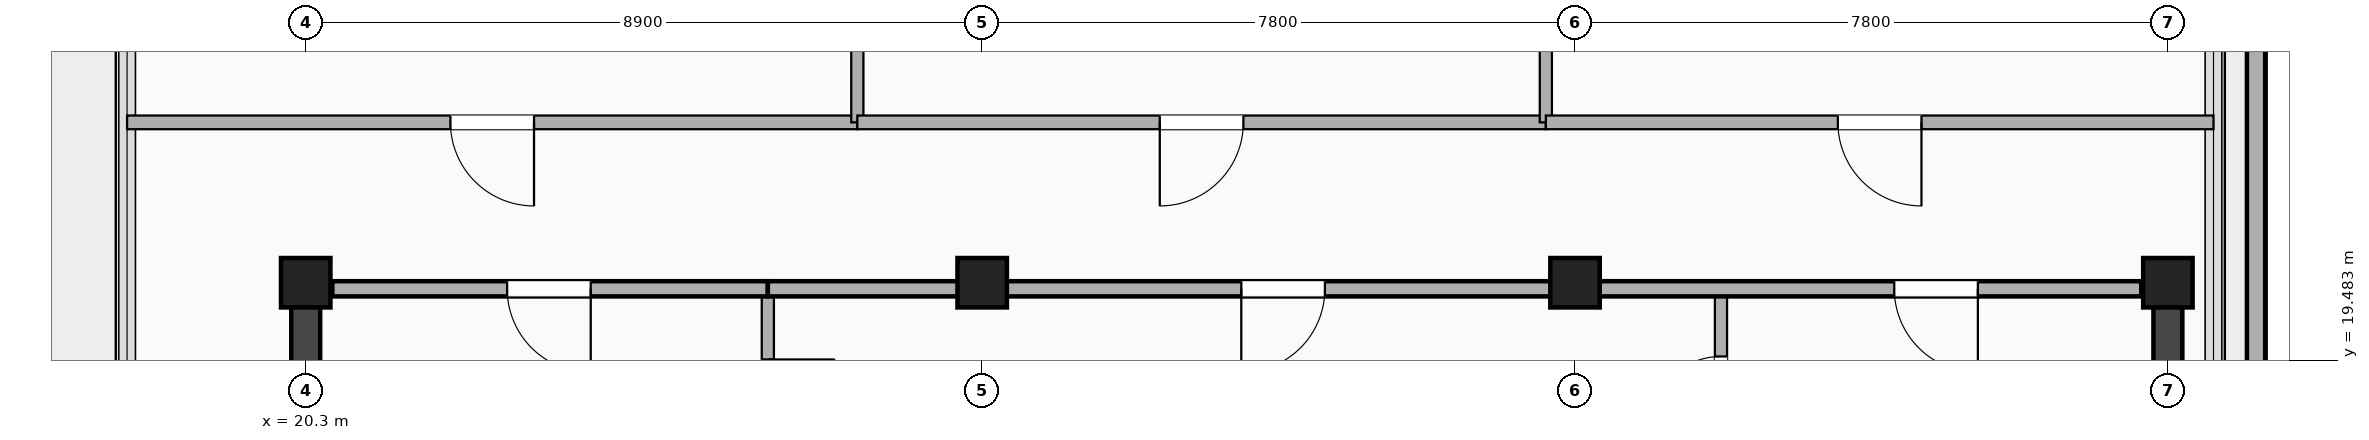
"""IFC4 building model, lengths in metres.
Left out: names, types, materials, properties, quantities, classifications, styles, units other than length and angle.
Written with IfcOpenShell. Run it as: python <this file> out.ifc"""

import sys

from ifc_helpers import new_model, si_unit, direction, frame, frame_2d, origin, origin_2d, place, context, subcontext, project, spatial, rectangle, extrude, element, fill, save


model = new_model("IFC4")
c1 = context("Model", 3, precision=1e-05, world=origin(), true_north=direction((0.0, 1.0)))
c2 = subcontext(c1, "Body", "Model", "MODEL_VIEW")
j1 = project(units=[si_unit("LENGTHUNIT", "METRE"), si_unit("PLANEANGLEUNIT", "RADIAN")], contexts=[c1])
p1 = place(None, origin())
s1 = spatial("IfcSite", under=j1, at=p1, CompositionType="ELEMENT")
p2 = place(p1, origin())
s2 = spatial("IfcBuilding", under=s1, at=p2, CompositionType="ELEMENT")
p3 = place(p2, frame((0.0, 0.0, 303.3)))
s3 = spatial("IfcBuildingStorey", under=s2, at=p3, CompositionType="ELEMENT", Elevation=303.3)
for number, where, z_axis, x_axis in (
    (1, (20.3, 3.5, 0.0), (0.0, 0.0, 1.0), (0.0, 1.0, 0.0)),
    (2, (44.8, 3.5, 0.0), (0.0, 0.0, 1.0), (0.0, 1.0, 0.0)),
):
    element("IfcWall", number, at=place(p3, frame(where, z_axis=z_axis, x_axis=x_axis)), inside=s3, PredefinedType="SHEAR", context=c2, shape_type="SweptSolid", body=[
        extrude(rectangle(XDim=16.9, YDim=0.38, at=frame_2d((8.45, 0.0))), origin(), (0.0, 0.0, 1.0), 4.3),
    ])
for number, where, z_axis, x_axis in (
    (3, (20.3, 20.5, -0.3), (0.0, 0.0, 1.0), (1.0, 0.0, 0.0)),
    (4, (29.2, 20.5, -0.3), (0.0, 0.0, 1.0), (1.0, 0.0, 0.0)),
    (5, (37.0, 20.5, -0.3), (0.0, 0.0, 1.0), (1.0, 0.0, 0.0)),
    (6, (44.8, 20.5, -0.3), (0.0, 0.0, 1.0), (1.0, 0.0, 0.0)),
):
    element("IfcColumn", number, at=place(p3, frame(where, z_axis=z_axis, x_axis=x_axis)), inside=s3, PredefinedType="COLUMN", context=c2, shape_type="SweptSolid", body=[
        extrude(rectangle(XDim=0.65, YDim=0.65, at=origin_2d()), origin(), (0.0, 0.0, 1.0), 4.6),
    ])
p4 = place(p3, frame((45.96, 3.5, 0.0), z_axis=(0.0, 0.0, 1.0), x_axis=(0.0, 1.0, 0.0)))
e7 = element("IfcWall", 7, at=p4, inside=s3, PredefinedType="PARAPET", context=c2, shape_type="SweptSolid", body=[
    extrude(rectangle(XDim=24.7, YDim=0.24, at=frame_2d((12.35, 0.0))), origin(), (0.0, 0.0, 1.0), 1.25),
])
p5 = place(p3, frame((26.38, 17.76, 0.0), z_axis=(0.0, 0.0, 1.0), x_axis=(0.0, 1.0, 0.0)))
e8 = element("IfcWall", 8, at=p5, inside=s3, PredefinedType="PARTITIONING", context=c2, shape_type="SweptSolid", body=[
    extrude(rectangle(XDim=2.66, YDim=0.16, at=frame_2d((1.33, 0.0))), origin(), (0.0, 0.0, 1.0), 3.512),
])
p6 = place(p5, frame((0.85, 0.0, 0.0)))
e9 = element("IfcOpeningElement", 9, at=p6, cuts=e8, PredefinedType="OPENING", context=c2, shape_type="SweptSolid", body=[
    extrude(rectangle(XDim=0.88, YDim=2.08, at=frame_2d((0.44, 1.04))), frame((0.0, 0.09, 0.0), z_axis=(0.0, -1.0, 0.0), x_axis=(1.0, 0.0, 0.0)), (0.0, 0.0, 1.0), 0.18),
])
p7 = place(p3, frame((38.92, 17.76, 0.0), z_axis=(0.0, 0.0, 1.0), x_axis=(0.0, 1.0, 0.0)))
e10 = element("IfcWall", 10, at=p7, inside=s3, PredefinedType="PARTITIONING", context=c2, shape_type="SweptSolid", body=[
    extrude(rectangle(XDim=2.66, YDim=0.16, at=frame_2d((1.33, 0.0))), origin(), (0.0, 0.0, 1.0), 3.885),
])
p8 = place(p7, frame((1.77, 0.0, 0.0), z_axis=(0.0, 0.0, 1.0), x_axis=(-1.0, 0.0, 0.0)))
e11 = element("IfcOpeningElement", 11, at=p8, cuts=e10, PredefinedType="OPENING", context=c2, shape_type="SweptSolid", body=[
    extrude(rectangle(XDim=0.92, YDim=2.08, at=frame_2d((0.46, 1.04))), frame((0.0, 0.09, 0.0), z_axis=(0.0, -1.0, 0.0), x_axis=(1.0, 0.0, 0.0)), (0.0, 0.0, 1.0), 0.18),
])
p9 = place(p3, frame((20.65, 20.42, 0.0), z_axis=(0.0, 0.0, 1.0), x_axis=(1.0, 0.0, 0.0)))
e12 = element("IfcWall", 12, at=p9, inside=s3, PredefinedType="PARTITIONING", context=c2, shape_type="SweptSolid", body=[
    extrude(rectangle(XDim=5.73, YDim=0.2, at=frame_2d((2.865, 0.0))), origin(), (0.0, 0.0, 1.0), 2.605),
])
p10 = place(p9, frame((2.3, 0.0, 0.0)))
e13 = element("IfcOpeningElement", 13, at=p10, cuts=e12, PredefinedType="OPENING", context=c2, shape_type="SweptSolid", body=[
    extrude(rectangle(XDim=1.1, YDim=2.15, at=frame_2d((0.55, 1.075))), frame((0.0, 0.11, 0.0), z_axis=(0.0, -1.0, 0.0), x_axis=(1.0, 0.0, 0.0)), (0.0, 0.0, 1.0), 0.22),
])
p11 = place(p3, frame((26.38, 20.42, 0.0), z_axis=(0.0, 0.0, 1.0), x_axis=(1.0, 0.0, 0.0)))
e14 = element("IfcWall", 14, at=p11, inside=s3, PredefinedType="PARTITIONING", context=c2, shape_type="SweptSolid", body=[
    extrude(rectangle(XDim=2.82, YDim=0.2, at=frame_2d((1.41, 0.0))), origin(), (0.0, 0.0, 1.0), 2.605),
])
p12 = place(p3, frame((29.2, 20.42, 0.0), z_axis=(0.0, 0.0, 1.0), x_axis=(1.0, 0.0, 0.0)))
e15 = element("IfcWall", 15, at=p12, inside=s3, PredefinedType="PARTITIONING", context=c2, shape_type="SweptSolid", body=[
    extrude(rectangle(XDim=7.8, YDim=0.2, at=frame_2d((3.9, 0.0))), origin(), (0.0, 0.0, 1.0), 2.605),
])
p13 = place(p12, frame((3.409, 0.0, 0.0)))
e16 = element("IfcOpeningElement", 16, at=p13, cuts=e15, PredefinedType="OPENING", context=c2, shape_type="SweptSolid", body=[
    extrude(rectangle(XDim=1.1, YDim=2.15, at=frame_2d((0.55, 1.075))), frame((0.0, 0.11, 0.0), z_axis=(0.0, -1.0, 0.0), x_axis=(1.0, 0.0, 0.0)), (0.0, 0.0, 1.0), 0.22),
])
p14 = place(p3, frame((37.0, 20.42, 0.0), z_axis=(0.0, 0.0, 1.0), x_axis=(1.0, 0.0, 0.0)))
e17 = element("IfcWall", 17, at=p14, inside=s3, PredefinedType="PARTITIONING", context=c2, shape_type="SweptSolid", body=[
    extrude(rectangle(XDim=7.45, YDim=0.2, at=frame_2d((3.725, 0.0))), origin(), (0.0, 0.0, 1.0), 2.605),
])
p15 = place(p14, frame((4.2, 0.0, 0.0)))
e18 = element("IfcOpeningElement", 18, at=p15, cuts=e17, PredefinedType="OPENING", context=c2, shape_type="SweptSolid", body=[
    extrude(rectangle(XDim=1.1, YDim=2.15, at=frame_2d((0.55, 1.075))), frame((0.0, 0.11, 0.0), z_axis=(0.0, -1.0, 0.0), x_axis=(1.0, 0.0, 0.0)), (0.0, 0.0, 1.0), 0.22),
])
p16 = place(p3, frame((17.95, 22.61, 0.0), z_axis=(0.0, 0.0, 1.0), x_axis=(1.0, 0.0, 0.0)))
e19 = element("IfcWall", 19, at=p16, inside=s3, PredefinedType="PARTITIONING", context=c2, shape_type="SweptSolid", body=[
    extrude(rectangle(XDim=9.608, YDim=0.18, at=frame_2d((4.804, 0.0))), origin(), (0.0, 0.0, 1.0), 2.605),
])
p17 = place(p16, frame((4.254, 0.0, 0.0)))
e20 = element("IfcOpeningElement", 20, at=p17, cuts=e19, PredefinedType="OPENING", context=c2, shape_type="SweptSolid", body=[
    extrude(rectangle(XDim=1.1, YDim=2.15, at=frame_2d((0.55, 1.075))), frame((0.0, 0.1, 0.0), z_axis=(0.0, -1.0, 0.0), x_axis=(1.0, 0.0, 0.0)), (0.0, 0.0, 1.0), 0.2),
])
p18 = place(p3, frame((27.558, 22.61, 0.0), z_axis=(0.0, 0.0, 1.0), x_axis=(0.0, 1.0, 0.0)))
e21 = element("IfcWall", 21, at=p18, inside=s3, PredefinedType="PARTITIONING", context=c2, shape_type="SweptSolid", body=[
    extrude(rectangle(XDim=4.34, YDim=0.16, at=frame_2d((2.17, 0.0))), origin(), (0.0, 0.0, 1.0), 3.885),
])
p19 = place(p3, frame((27.558, 22.61, 0.0), z_axis=(0.0, 0.0, 1.0), x_axis=(1.0, 0.0, 0.0)))
e22 = element("IfcWall", 22, at=p19, inside=s3, PredefinedType="PARTITIONING", context=c2, shape_type="SweptSolid", body=[
    extrude(rectangle(XDim=9.058, YDim=0.18, at=frame_2d((4.529, 0.0))), origin(), (0.0, 0.0, 1.0), 2.605),
])
p20 = place(p19, frame((3.979, 0.0, 0.0)))
e23 = element("IfcOpeningElement", 23, at=p20, cuts=e22, PredefinedType="OPENING", context=c2, shape_type="SweptSolid", body=[
    extrude(rectangle(XDim=1.1, YDim=2.15, at=frame_2d((0.55, 1.075))), frame((0.0, 0.1, 0.0), z_axis=(0.0, -1.0, 0.0), x_axis=(1.0, 0.0, 0.0)), (0.0, 0.0, 1.0), 0.2),
])
p21 = place(p3, frame((36.616, 22.61, 0.0), z_axis=(0.0, 0.0, 1.0), x_axis=(0.0, 1.0, 0.0)))
e24 = element("IfcWall", 24, at=p21, inside=s3, PredefinedType="PARTITIONING", context=c2, shape_type="SweptSolid", body=[
    extrude(rectangle(XDim=4.34, YDim=0.16, at=frame_2d((2.17, 0.0))), origin(), (0.0, 0.0, 1.0), 2.605),
])
p22 = place(p3, frame((36.616, 22.61, 0.0), z_axis=(0.0, 0.0, 1.0), x_axis=(1.0, 0.0, 0.0)))
e25 = element("IfcWall", 25, at=p22, inside=s3, PredefinedType="PARTITIONING", context=c2, shape_type="SweptSolid", body=[
    extrude(rectangle(XDim=8.784, YDim=0.18, at=frame_2d((4.392, 0.0))), origin(), (0.0, 0.0, 1.0), 2.605),
])
p23 = place(p22, frame((3.842, 0.0, 0.0)))
e26 = element("IfcOpeningElement", 26, at=p23, cuts=e25, PredefinedType="OPENING", context=c2, shape_type="SweptSolid", body=[
    extrude(rectangle(XDim=1.1, YDim=2.15, at=frame_2d((0.55, 1.075))), frame((0.0, 0.1, 0.0), z_axis=(0.0, -1.0, 0.0), x_axis=(1.0, 0.0, 0.0)), (0.0, 0.0, 1.0), 0.2),
])
p24 = place(p8, origin())
e27 = element("IfcDoor", 27, at=p24, inside=s3, OperationType="SINGLE_SWING_LEFT", PredefinedType="DOOR", context=c2, shape_type="SweptSolid", body=[
    extrude(rectangle(XDim=0.92, YDim=2.08, at=frame_2d((0.46, 1.04))), frame((0.0, 0.025, 0.0), z_axis=(0.0, -1.0, 0.0), x_axis=(1.0, 0.0, 0.0)), (0.0, 0.0, 1.0), 0.05),
])
fill(e11, e27)
p25 = place(p10, origin())
e28 = element("IfcDoor", 28, at=p25, inside=s3, OperationType="SINGLE_SWING_RIGHT", PredefinedType="DOOR", context=c2, shape_type="SweptSolid", body=[
    extrude(rectangle(XDim=1.1, YDim=2.15, at=frame_2d((0.55, 1.075))), frame((0.0, 0.025, 0.0), z_axis=(0.0, -1.0, 0.0), x_axis=(1.0, 0.0, 0.0)), (0.0, 0.0, 1.0), 0.05),
])
fill(e13, e28)
p26 = place(p13, origin())
e29 = element("IfcDoor", 29, at=p26, inside=s3, OperationType="SINGLE_SWING_LEFT", PredefinedType="DOOR", context=c2, shape_type="SweptSolid", body=[
    extrude(rectangle(XDim=1.1, YDim=2.15, at=frame_2d((0.55, 1.075))), frame((0.0, 0.025, 0.0), z_axis=(0.0, -1.0, 0.0), x_axis=(1.0, 0.0, 0.0)), (0.0, 0.0, 1.0), 0.05),
])
fill(e16, e29)
p27 = place(p15, origin())
e30 = element("IfcDoor", 30, at=p27, inside=s3, OperationType="SINGLE_SWING_RIGHT", PredefinedType="DOOR", context=c2, shape_type="SweptSolid", body=[
    extrude(rectangle(XDim=1.1, YDim=2.15, at=frame_2d((0.55, 1.075))), frame((0.0, 0.025, 0.0), z_axis=(0.0, -1.0, 0.0), x_axis=(1.0, 0.0, 0.0)), (0.0, 0.0, 1.0), 0.05),
])
fill(e18, e30)
p28 = place(p17, origin())
e31 = element("IfcDoor", 31, at=p28, inside=s3, OperationType="SINGLE_SWING_RIGHT", PredefinedType="DOOR", context=c2, shape_type="SweptSolid", body=[
    extrude(rectangle(XDim=1.1, YDim=2.15, at=frame_2d((0.55, 1.075))), frame((0.0, 0.025, 0.0), z_axis=(0.0, -1.0, 0.0), x_axis=(1.0, 0.0, 0.0)), (0.0, 0.0, 1.0), 0.05),
])
fill(e20, e31)
p29 = place(p20, origin())
e32 = element("IfcDoor", 32, at=p29, inside=s3, OperationType="SINGLE_SWING_LEFT", PredefinedType="DOOR", context=c2, shape_type="SweptSolid", body=[
    extrude(rectangle(XDim=1.1, YDim=2.15, at=frame_2d((0.55, 1.075))), frame((0.0, 0.025, 0.0), z_axis=(0.0, -1.0, 0.0), x_axis=(1.0, 0.0, 0.0)), (0.0, 0.0, 1.0), 0.05),
])
fill(e23, e32)
p30 = place(p23, origin())
e33 = element("IfcDoor", 33, at=p30, inside=s3, OperationType="SINGLE_SWING_RIGHT", PredefinedType="DOOR", context=c2, shape_type="SweptSolid", body=[
    extrude(rectangle(XDim=1.1, YDim=2.15, at=frame_2d((0.55, 1.075))), frame((0.0, 0.025, 0.0), z_axis=(0.0, -1.0, 0.0), x_axis=(1.0, 0.0, 0.0)), (0.0, 0.0, 1.0), 0.05),
])
fill(e26, e33)
save(model, sys.argv[1])
